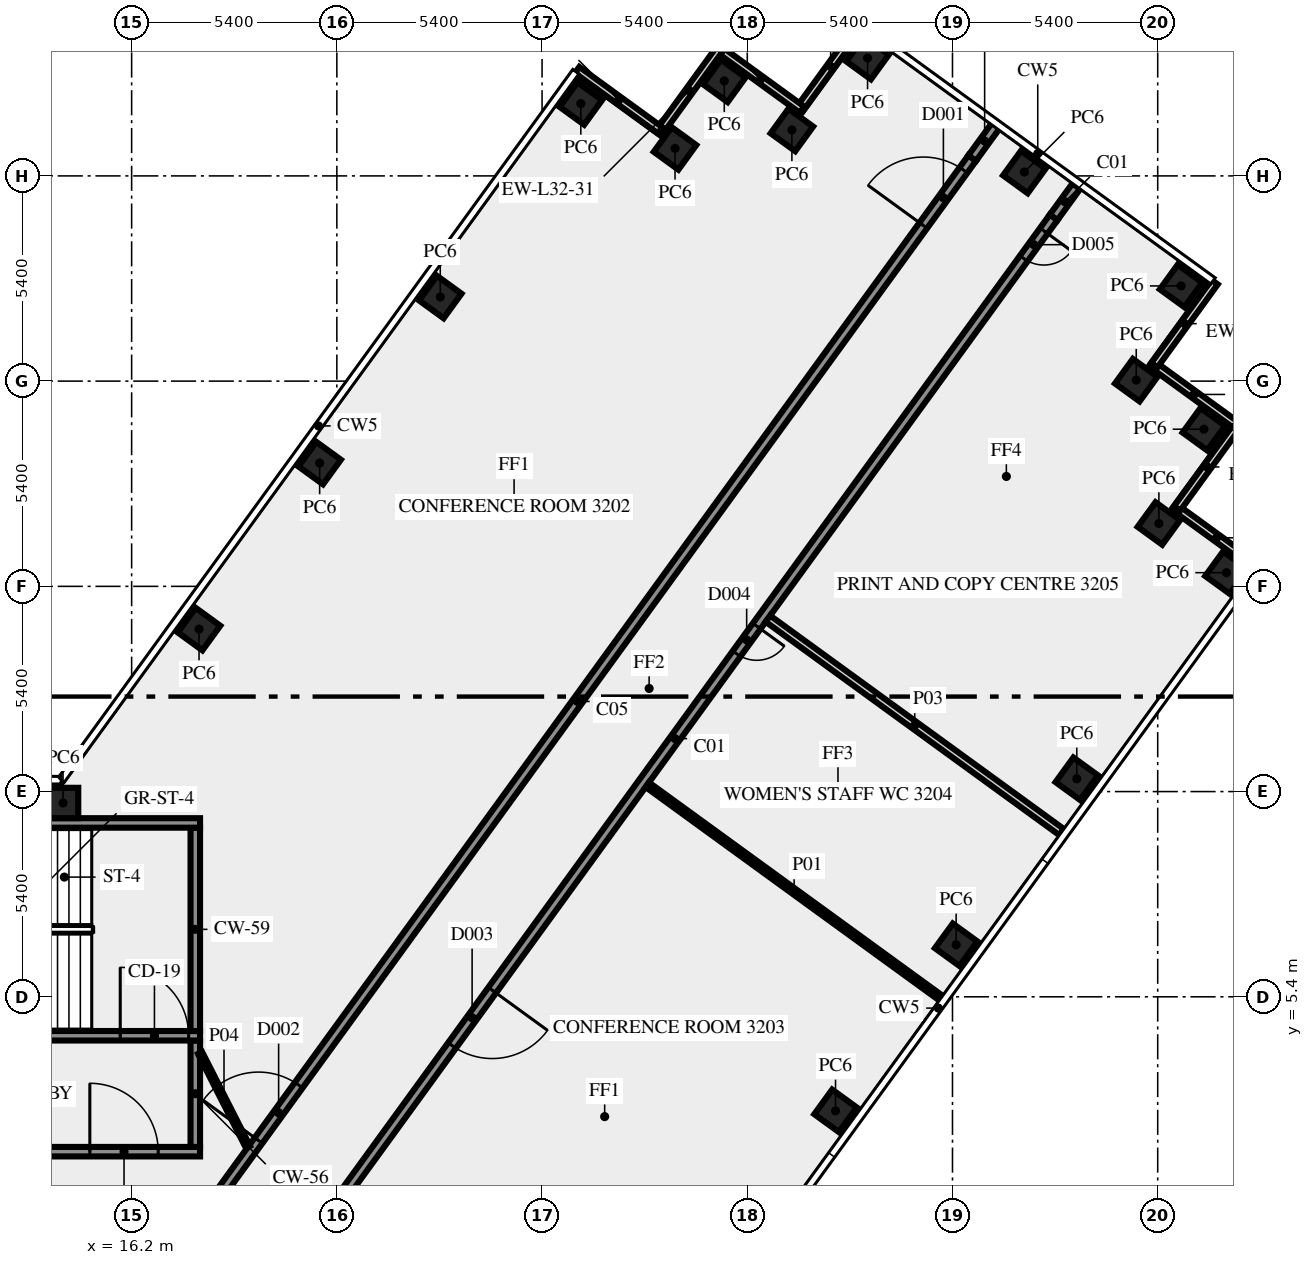
"""IFC4 building model, lengths in metres.
Left out: names, types, materials, properties, quantities, classifications, styles, units other than length and angle.
Written with IfcOpenShell. Run it as: python <this file> out.ifc"""

import sys

from ifc_helpers import new_model, si_unit, direction, frame, frame_2d, origin, origin_2d, place, context, subcontext, project, spatial, rectangle, extrude, element, fill, save


model = new_model("IFC4")
c1 = context("Model", 3, precision=1e-05, world=origin(), true_north=direction((0.0, 1.0)))
c2 = subcontext(c1, "Body", "Model", "MODEL_VIEW")
j1 = project(units=[si_unit("LENGTHUNIT", "METRE"), si_unit("PLANEANGLEUNIT", "RADIAN")], contexts=[c1])
p1 = place(None, origin())
s1 = spatial("IfcSite", under=j1, at=p1, CompositionType="ELEMENT")
p2 = place(p1, origin())
s2 = spatial("IfcBuilding", under=s1, at=p2, CompositionType="ELEMENT")
p3 = place(p2, frame((0.0, 0.0, 139.0)))
s3 = spatial("IfcBuildingStorey", under=s2, at=p3, CompositionType="ELEMENT", Elevation=139.0)
for number, where, z_axis, x_axis in (
    (1, (34.722, 2.4, 0.0), (0.0, 0.0, 1.0), (0.588, 0.809, 0.0)),
    (2, (37.896, 6.769, 0.0), (0.0, 0.0, 1.0), (0.588, 0.809, 0.0)),
    (3, (41.07, 11.137, 0.0), (0.0, 0.0, 1.0), (0.588, 0.809, 0.0)),
    (4, (45.01, 16.56, 0.0), (0.0, 0.0, 1.0), (0.588, 0.809, 0.0)),
    (5, (43.231, 17.854, 0.0), (0.0, 0.0, 1.0), (0.588, 0.809, 0.0)),
    (6, (44.415, 20.335, 0.0), (0.0, 0.0, 1.0), (0.588, 0.809, 0.0)),
    (7, (42.635, 21.626, 0.0), (0.0, 0.0, 1.0), (-0.809, 0.588, 0.0)),
    (8, (43.815, 24.105, 0.0), (0.0, 0.0, 1.0), (-0.809, 0.588, 0.0)),
    (9, (39.691, 27.102, 0.0), (0.0, 0.0, 1.0), (-0.809, 0.588, 0.0)),
    (10, (35.565, 30.1, 0.0), (0.0, 0.0, 1.0), (-0.588, -0.809, 0.0)),
    (11, (33.574, 28.209, 0.0), (0.0, 0.0, 1.0), (-0.809, 0.588, 0.0)),
    (12, (31.795, 29.5, 0.0), (0.0, 0.0, 1.0), (-0.588, -0.809, 0.0)),
    (13, (30.499, 27.723, 0.0), (0.0, 0.0, 1.0), (-0.809, 0.588, 0.0)),
    (14, (28.02, 28.905, 0.0), (0.0, 0.0, 1.0), (-0.809, 0.588, 0.0)),
    (15, (24.321, 23.812, 0.0), (0.0, 0.0, 1.0), (-0.588, -0.809, 0.0)),
    (16, (21.147, 19.444, 0.0), (0.0, 0.0, 1.0), (-0.588, -0.809, 0.0)),
    (17, (17.974, 15.075, 0.0), (0.0, 0.0, 1.0), (-0.588, -0.809, 0.0)),
    (18, (14.395, 10.5, 0.0), (0.0, 0.0, 1.0), (-1.0, 0.0, 0.0)),
):
    element("IfcColumn", number, at=place(p3, frame(where, z_axis=z_axis, x_axis=x_axis)), inside=s3, PredefinedType="COLUMN", context=c2, shape_type="SweptSolid", body=[
        extrude(rectangle(XDim=0.8, YDim=0.8, at=origin_2d()), origin(), (0.0, 0.0, 1.0), 4.65),
    ])
for number, where, z_axis, x_axis in (
    (19, (45.842, 16.685, 0.0), (0.0, 0.0, 1.0), (-0.809, 0.588, 0.0)),
    (20, (43.709, 18.249, 0.0), (0.0, 0.0, 1.0), (0.588, 0.809, 0.0)),
    (21, (45.245, 20.456, 0.0), (0.0, 0.0, 1.0), (-0.809, 0.588, 0.0)),
    (22, (43.113, 22.02, 0.0), (0.0, 0.0, 1.0), (0.588, 0.809, 0.0)),
    (23, (35.388, 30.97, 0.0), (0.0, 0.0, 1.0), (-0.588, -0.809, 0.0)),
    (24, (33.838, 28.744, 0.0), (0.0, 0.0, 1.0), (-0.809, 0.588, 0.0)),
    (25, (31.67, 30.333, 0.0), (0.0, 0.0, 1.0), (-0.588, -0.809, 0.0)),
    (26, (30.106, 28.2, 0.0), (0.0, 0.0, 1.0), (-0.809, 0.588, 0.0)),
):
    element("IfcWall", number, at=place(p3, frame(where, z_axis=z_axis, x_axis=x_axis)), inside=s3, PredefinedType="SOLIDWALL", context=c2, shape_type="SweptSolid", body=[
        extrude(rectangle(XDim=2.7, YDim=0.2, at=frame_2d((1.35, 0.0))), origin(), (0.0, 0.0, 1.0), 4.65),
    ])
p4 = place(p3, frame((7.5, 1.325, 0.0), z_axis=(0.0, 0.0, 1.0), x_axis=(1.0, 0.0, 0.0)))
e27 = element("IfcWall", 27, at=p4, inside=s3, PredefinedType="SHEAR", context=c2, shape_type="SweptSolid", body=[
    extrude(rectangle(XDim=10.5, YDim=0.25, at=frame_2d((5.25, 0.0))), origin(), (0.0, 0.0, 1.0), 4.65),
])
p5 = place(p4, frame((7.6, 0.0, 0.0)))
e28 = element("IfcOpeningElement", 28, at=p5, cuts=e27, PredefinedType="OPENING", context=c2, shape_type="SweptSolid", body=[
    extrude(rectangle(XDim=1.8, YDim=2.1, at=frame_2d((0.9, 1.05))), frame((0.0, 0.135, 0.0), z_axis=(0.0, -1.0, 0.0), x_axis=(1.0, 0.0, 0.0)), (0.0, 0.0, 1.0), 0.27),
])
p6 = place(p3, frame((17.875, 1.45, 0.0), z_axis=(0.0, 0.0, 1.0), x_axis=(0.0, 1.0, 0.0)))
e29 = element("IfcWall", 29, at=p6, inside=s3, PredefinedType="SHEAR", context=c2, shape_type="SweptSolid", body=[
    extrude(rectangle(XDim=2.8, YDim=0.25, at=frame_2d((1.4, 0.0))), origin(), (0.0, 0.0, 1.0), 4.65),
])
p7 = place(p3, frame((7.5, 4.375, 0.0), z_axis=(0.0, 0.0, 1.0), x_axis=(1.0, 0.0, 0.0)))
e30 = element("IfcWall", 30, at=p7, inside=s3, PredefinedType="SHEAR", context=c2, shape_type="SweptSolid", body=[
    extrude(rectangle(XDim=10.5, YDim=0.25, at=frame_2d((5.25, 0.0))), origin(), (0.0, 0.0, 1.0), 4.65),
])
p8 = place(p7, frame((8.4, 0.0, 0.0)))
e31 = element("IfcOpeningElement", 31, at=p8, cuts=e30, PredefinedType="OPENING", context=c2, shape_type="SweptSolid", body=[
    extrude(rectangle(XDim=1.8, YDim=2.1, at=frame_2d((0.9, 1.05))), frame((0.0, 0.135, 0.0), z_axis=(0.0, -1.0, 0.0), x_axis=(1.0, 0.0, 0.0)), (0.0, 0.0, 1.0), 0.27),
])
p9 = place(p3, frame((17.875, 4.5, 0.0), z_axis=(0.0, 0.0, 1.0), x_axis=(0.0, 1.0, 0.0)))
e32 = element("IfcWall", 32, at=p9, inside=s3, PredefinedType="SHEAR", context=c2, shape_type="SweptSolid", body=[
    extrude(rectangle(XDim=5.35, YDim=0.25, at=frame_2d((2.675, 0.0))), origin(), (0.0, 0.0, 1.0), 4.65),
])
p10 = place(p3, frame((7.5, 9.975, 0.0), z_axis=(0.0, 0.0, 1.0), x_axis=(1.0, 0.0, 0.0)))
e33 = element("IfcWall", 33, at=p10, inside=s3, PredefinedType="SHEAR", context=c2, shape_type="SweptSolid", body=[
    extrude(rectangle(XDim=10.5, YDim=0.25, at=frame_2d((5.25, 0.0))), origin(), (0.0, 0.0, 1.0), 4.65),
])
p11 = place(p10, frame((2.0, 0.0, 1.0)))
e34 = element("IfcOpeningElement", 34, at=p11, cuts=e33, PredefinedType="OPENING", context=c2, shape_type="SweptSolid", body=[
    extrude(rectangle(XDim=1.2, YDim=1.2, at=frame_2d((0.6, 0.6))), frame((0.0, 0.135, 0.0), z_axis=(0.0, -1.0, 0.0), x_axis=(1.0, 0.0, 0.0)), (0.0, 0.0, 1.0), 0.27),
])
p12 = place(p3, frame((40.463, 25.911, 0.0), z_axis=(0.0, 0.0, 1.0), x_axis=(-0.587781654618, -0.809019608226, 0.0)))
e35 = element("IfcWall", 35, at=p12, inside=s3, PredefinedType="SOLIDWALL", context=c2, shape_type="SweptSolid", body=[
    extrude(rectangle(XDim=33.911, YDim=0.25, at=frame_2d((16.956, 0.0))), origin(), (0.0, 0.0, 1.0), 4.65),
])
p13 = place(p12, frame((25.137, 0.0, 0.0)))
e36 = element("IfcOpeningElement", 36, at=p13, cuts=e35, PredefinedType="OPENING", context=c2, shape_type="SweptSolid", body=[
    extrude(rectangle(XDim=1.8, YDim=2.1, at=frame_2d((0.9, 1.05))), frame((0.0, 0.135, 0.0), z_axis=(0.0, -1.0, 0.0), x_axis=(1.0, 0.0, 0.0)), (0.0, 0.0, 1.0), 0.27),
])
p14 = place(p12, frame((13.296, 0.0, 0.0)))
e37 = element("IfcOpeningElement", 37, at=p14, cuts=e35, PredefinedType="OPENING", context=c2, shape_type="SweptSolid", body=[
    extrude(rectangle(XDim=0.9, YDim=2.1, at=frame_2d((0.45, 1.05))), frame((0.0, 0.135, 0.0), z_axis=(0.0, -1.0, 0.0), x_axis=(1.0, 0.0, 0.0)), (0.0, 0.0, 1.0), 0.27),
])
p15 = place(p12, frame((0.441, 0.0, 0.0)))
e38 = element("IfcOpeningElement", 38, at=p15, cuts=e35, PredefinedType="OPENING", context=c2, shape_type="SweptSolid", body=[
    extrude(rectangle(XDim=0.9, YDim=2.1, at=frame_2d((0.45, 1.05))), frame((0.0, 0.135, 0.0), z_axis=(0.0, -1.0, 0.0), x_axis=(1.0, 0.0, 0.0)), (0.0, 0.0, 1.0), 0.27),
])
p16 = place(p3, frame((17.545, -1.125, 0.0), z_axis=(0.0, 0.0, 1.0), x_axis=(0.587788021768, 0.809014982226, 0.0)))
e39 = element("IfcWall", 39, at=p16, inside=s3, PredefinedType="SOLIDWALL", context=c2, shape_type="SweptSolid", body=[
    extrude(rectangle(XDim=35.344, YDim=0.25, at=frame_2d((17.672, 0.0))), origin(), (0.0, 0.0, 1.0), 4.65),
])
p17 = place(p16, frame((33.153, 0.0, 0.0)))
e40 = element("IfcOpeningElement", 40, at=p17, cuts=e39, PredefinedType="OPENING", context=c2, shape_type="SweptSolid", body=[
    extrude(rectangle(XDim=1.8, YDim=2.1, at=frame_2d((0.9, 1.05))), frame((0.0, 0.135, 0.0), z_axis=(0.0, -1.0, 0.0), x_axis=(1.0, 0.0, 0.0)), (0.0, 0.0, 1.0), 0.27),
])
p18 = place(p16, frame((3.392, 0.0, 0.0)))
e41 = element("IfcOpeningElement", 41, at=p18, cuts=e39, PredefinedType="OPENING", context=c2, shape_type="SweptSolid", body=[
    extrude(rectangle(XDim=1.8, YDim=2.1, at=frame_2d((0.9, 1.05))), frame((0.0, 0.135, 0.0), z_axis=(0.0, -1.0, 0.0), x_axis=(1.0, 0.0, 0.0)), (0.0, 0.0, 1.0), 0.27),
])
p19 = place(p3, frame((37.496, 5.367, 0.0), z_axis=(0.0, 0.0, 1.0), x_axis=(-0.809048817734, 0.587741448702, 0.0)))
e42 = element("IfcWall", 42, at=p19, inside=s3, PredefinedType="PARTITIONING", context=c2, shape_type="SweptSolid", body=[
    extrude(rectangle(XDim=9.55, YDim=0.15, at=frame_2d((4.775, 0.0))), origin(), (0.0, 0.0, 1.0), 3.85),
])
p20 = place(p3, frame((40.67, 9.735, 0.0), z_axis=(0.0, 0.0, 1.0), x_axis=(-0.809033337127, 0.587762757767, 0.0)))
e43 = element("IfcWall", 43, at=p20, inside=s3, PredefinedType="SOLIDWALL", context=c2, shape_type="SweptSolid", body=[
    extrude(rectangle(XDim=9.551, YDim=0.2, at=frame_2d((4.775, 0.0))), origin(), (0.0, 0.0, 1.0), 3.85),
])
p21 = place(p3, frame((18.0, 3.925, 0.0), z_axis=(0.0, 0.0, 1.0), x_axis=(0.453950796792, -0.891026752736, 0.0)))
e44 = element("IfcWall", 44, at=p21, inside=s3, PredefinedType="PARTITIONING", context=c2, shape_type="SweptSolid", body=[
    extrude(rectangle(XDim=2.778, YDim=0.12, at=frame_2d((1.389, 0.0))), origin(), (0.0, 0.0, 1.0), 4.65),
])
p22 = place(p3, frame((40.463, 25.911, 0.0), z_axis=(0.0, 0.0, 1.0), x_axis=(0.587855200732, 0.808966169238, 0.0)))
e45 = element("IfcWall", 45, at=p22, inside=s3, PredefinedType="SOLIDWALL", context=c2, shape_type="SweptSolid", body=[
    extrude(rectangle(XDim=1.009, YDim=0.25, at=frame_2d((0.505, 0.0))), origin(), (0.0, 0.0, 1.0), 3.85),
])
p23 = place(p3, frame((38.32, 27.469, 0.0), z_axis=(0.0, 0.0, 1.0), x_axis=(0.587753086208, 0.809040363426, 0.0)))
e46 = element("IfcWall", 46, at=p23, inside=s3, PredefinedType="SOLIDWALL", context=c2, shape_type="SweptSolid", body=[
    extrude(rectangle(XDim=1.11, YDim=0.25, at=frame_2d((0.555, 0.0))), origin(), (0.0, 0.0, 1.0), 3.85),
])
p24 = place(p5, origin())
e47 = element("IfcDoor", 47, at=p24, inside=s3, OperationType="DOUBLE_DOOR_SINGLE_SWING", PredefinedType="DOOR", context=c2, shape_type="SweptSolid", body=[
    extrude(rectangle(XDim=1.8, YDim=2.1, at=frame_2d((0.9, 1.05))), frame((0.0, 0.025, 0.0), z_axis=(0.0, -1.0, 0.0), x_axis=(1.0, 0.0, 0.0)), (0.0, 0.0, 1.0), 0.05),
])
fill(e28, e47)
p25 = place(p8, origin())
e48 = element("IfcDoor", 48, at=p25, inside=s3, OperationType="DOUBLE_DOOR_SINGLE_SWING", PredefinedType="DOOR", context=c2, shape_type="SweptSolid", body=[
    extrude(rectangle(XDim=1.8, YDim=2.1, at=frame_2d((0.9, 1.05))), frame((0.0, 0.025, 0.0), z_axis=(0.0, -1.0, 0.0), x_axis=(1.0, 0.0, 0.0)), (0.0, 0.0, 1.0), 0.05),
])
fill(e31, e48)
p26 = place(p17, origin())
e49 = element("IfcDoor", 49, at=p26, inside=s3, OperationType="DOUBLE_DOOR_SINGLE_SWING", PredefinedType="DOOR", context=c2, shape_type="SweptSolid", body=[
    extrude(rectangle(XDim=1.8, YDim=2.1, at=frame_2d((0.9, 1.05))), frame((0.0, 0.025, 0.0), z_axis=(0.0, -1.0, 0.0), x_axis=(1.0, 0.0, 0.0)), (0.0, 0.0, 1.0), 0.05),
])
fill(e40, e49)
p27 = place(p18, origin())
e50 = element("IfcDoor", 50, at=p27, inside=s3, OperationType="DOUBLE_DOOR_SINGLE_SWING", PredefinedType="DOOR", context=c2, shape_type="SweptSolid", body=[
    extrude(rectangle(XDim=1.8, YDim=2.1, at=frame_2d((0.9, 1.05))), frame((0.0, 0.025, 0.0), z_axis=(0.0, -1.0, 0.0), x_axis=(1.0, 0.0, 0.0)), (0.0, 0.0, 1.0), 0.05),
])
fill(e41, e50)
p28 = place(p13, origin())
e51 = element("IfcDoor", 51, at=p28, inside=s3, OperationType="DOUBLE_DOOR_SINGLE_SWING", PredefinedType="DOOR", context=c2, shape_type="SweptSolid", body=[
    extrude(rectangle(XDim=1.8, YDim=2.1, at=frame_2d((0.9, 1.05))), frame((0.0, 0.025, 0.0), z_axis=(0.0, -1.0, 0.0), x_axis=(1.0, 0.0, 0.0)), (0.0, 0.0, 1.0), 0.05),
])
fill(e36, e51)
p29 = place(p14, origin())
e52 = element("IfcDoor", 52, at=p29, inside=s3, OperationType="SINGLE_SWING_LEFT", PredefinedType="DOOR", context=c2, shape_type="SweptSolid", body=[
    extrude(rectangle(XDim=0.9, YDim=2.1, at=frame_2d((0.45, 1.05))), frame((0.0, 0.025, 0.0), z_axis=(0.0, -1.0, 0.0), x_axis=(1.0, 0.0, 0.0)), (0.0, 0.0, 1.0), 0.05),
])
fill(e37, e52)
p30 = place(p15, origin())
e53 = element("IfcDoor", 53, at=p30, inside=s3, OperationType="SINGLE_SWING_LEFT", PredefinedType="DOOR", context=c2, shape_type="SweptSolid", body=[
    extrude(rectangle(XDim=0.9, YDim=2.1, at=frame_2d((0.45, 1.05))), frame((0.0, 0.025, 0.0), z_axis=(0.0, -1.0, 0.0), x_axis=(1.0, 0.0, 0.0)), (0.0, 0.0, 1.0), 0.05),
])
fill(e38, e53)
save(model, sys.argv[1])
